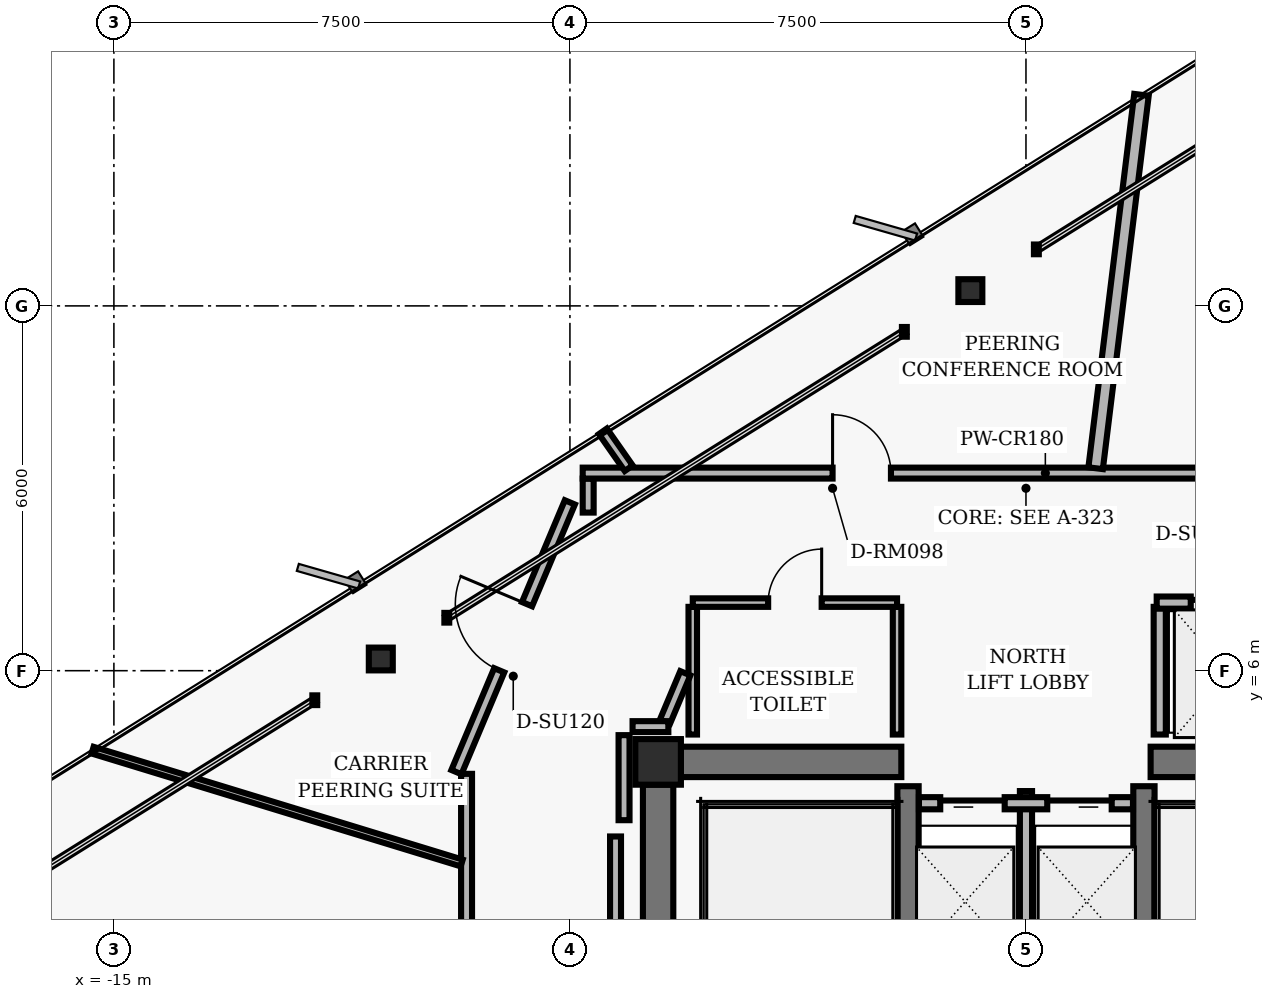
"""IFC4 building model, lengths in metres.
Left out: names, types, materials, properties, quantities, classifications, styles, units other than length and angle.
Written with IfcOpenShell. Run it as: python <this file> out.ifc"""

import sys

from ifc_helpers import new_model, si_unit, direction, frame, frame_2d, origin, origin_2d, place, context, subcontext, project, spatial, rectangle, hollow_rectangle, i_section, extrude, element, fill, save


model = new_model("IFC4")
c1 = context("Model", 3, precision=1e-05, world=origin(), true_north=direction((0.0, 1.0)))
c2 = subcontext(c1, "Body", "Model", "MODEL_VIEW")
j1 = project(units=[si_unit("LENGTHUNIT", "METRE"), si_unit("PLANEANGLEUNIT", "RADIAN")], contexts=[c1])
p1 = place(None, origin())
s1 = spatial("IfcSite", under=j1, at=p1, CompositionType="ELEMENT")
p2 = place(p1, origin())
s2 = spatial("IfcBuilding", under=s1, at=p2, CompositionType="ELEMENT")
p3 = place(p2, frame((0.0, 0.0, 211.84)))
s3 = spatial("IfcBuildingStorey", under=s2, at=p3, CompositionType="ELEMENT", Elevation=211.84)
p4 = place(p3, frame((-6.05, 4.5, 0.0), z_axis=(0.0, 0.0, 1.0), x_axis=(1.0, 0.0, 0.0)))
e1 = element("IfcColumn", 1, at=p4, inside=s3, PredefinedType="COLUMN", context=c2, shape_type="SweptSolid", body=[
    extrude(hollow_rectangle(XDim=0.75, YDim=0.75, WallThickness=0.05, InnerFilletRadius=0.02, OuterFilletRadius=0.04, at=origin_2d()), origin(), (0.0, 0.0, 1.0), 3.04),
])
p5 = place(p3, frame((-6.05, 0.375, 0.0), z_axis=(0.0, 0.0, 1.0), x_axis=(0.0, 1.0, 0.0)))
e2 = element("IfcWall", 2, at=p5, inside=s3, PredefinedType="SHEAR", context=c2, shape_type="SweptSolid", body=[
    extrude(rectangle(XDim=3.75, YDim=0.5, at=frame_2d((1.875, 0.0))), origin(), (0.0, 0.0, 1.0), 2.618),
])
for number, where, z_axis, x_axis in (
    (3, (-1.94, -4.1, 0.0), (0.0, 0.0, 1.0), (0.0, 1.0, 0.0)),
    (4, (1.94, -4.1, 0.0), (0.0, 0.0, 1.0), (0.0, 1.0, 0.0)),
):
    element("IfcWall", number, at=place(p3, frame(where, z_axis=z_axis, x_axis=x_axis)), inside=s3, PredefinedType="SHEAR", context=c2, shape_type="SweptSolid", body=[
        extrude(rectangle(XDim=8.2, YDim=0.35, at=frame_2d((4.1, 0.0))), origin(), (0.0, 0.0, 1.0), 2.618),
    ])
for number, where, z_axis, x_axis in (
    (5, (-5.675, 4.5, 0.0), (0.0, 0.0, 1.0), (1.0, 0.0, 0.0)),
    (6, (2.05, 4.5, 0.0), (0.0, 0.0, 1.0), (1.0, 0.0, 0.0)),
):
    element("IfcWall", number, at=place(p3, frame(where, z_axis=z_axis, x_axis=x_axis)), inside=s3, PredefinedType="SHEAR", context=c2, shape_type="SweptSolid", body=[
        extrude(rectangle(XDim=3.625, YDim=0.5, at=frame_2d((1.812, 0.0))), origin(), (0.0, 0.0, 1.0), 2.618),
    ])
for number, where, z_axis, x_axis in (
    (7, (-0.915, 12.251, 0.0), (0.0, 0.0, 1.0), (1.0, 0.0, 0.0)),
    (8, (-10.611, 6.193, 0.0), (0.0, 0.0, 1.0), (1.0, 0.0, 0.0)),
):
    element("IfcColumn", number, at=place(p3, frame(where, z_axis=z_axis, x_axis=x_axis)), inside=s3, PredefinedType="COLUMN", context=c2, shape_type="SweptSolid", body=[
        extrude(i_section(OverallWidth=0.394, OverallDepth=0.375, WebThickness=0.017, FlangeThickness=0.028, FilletRadius=0.016, at=origin_2d()), origin(), (0.0, 0.0, 1.0), 3.04),
    ])
p6 = place(p3, frame((0.0, 1.25, 0.0), z_axis=(0.0, 0.0, 1.0), x_axis=(0.0, 1.0, 0.0)))
e9 = element("IfcWall", 9, at=p6, inside=s3, PredefinedType="PARTITIONING", context=c2, shape_type="SweptSolid", body=[
    extrude(rectangle(XDim=2.77, YDim=0.2, at=frame_2d((1.385, 0.0))), origin(), (0.0, 0.0, 1.0), 2.593),
])
p7 = place(p3, frame((-1.76, 3.82, 0.0), z_axis=(0.0, 0.0, 1.0), x_axis=(1.0, 0.0, 0.0)))
e10 = element("IfcWall", 10, at=p7, inside=s3, PredefinedType="PARTITIONING", context=c2, shape_type="SweptSolid", body=[
    extrude(rectangle(XDim=3.52, YDim=0.2, at=frame_2d((1.76, 0.0))), origin(), (0.0, 0.0, 1.0), 2.593),
])
p8 = place(p7, frame((0.35, 0.0, 0.0)))
e11 = element("IfcOpeningElement", 11, at=p8, cuts=e10, PredefinedType="OPENING", context=c2, shape_type="SweptSolid", body=[
    extrude(rectangle(XDim=1.06, YDim=2.04, at=frame_2d((0.53, 1.02))), frame((0.0, 0.11, 0.0), z_axis=(0.0, -1.0, 0.0), x_axis=(1.0, 0.0, 0.0)), (0.0, 0.0, 1.0), 0.22),
])
p9 = place(p7, frame((2.11, 0.0, 0.0)))
e12 = element("IfcOpeningElement", 12, at=p9, cuts=e10, PredefinedType="OPENING", context=c2, shape_type="SweptSolid", body=[
    extrude(rectangle(XDim=1.06, YDim=2.04, at=frame_2d((0.53, 1.02))), frame((0.0, 0.11, 0.0), z_axis=(0.0, -1.0, 0.0), x_axis=(1.0, 0.0, 0.0)), (0.0, 0.0, 1.0), 0.22),
])
p10 = place(p3, frame((2.2, 4.95, 0.0), z_axis=(0.0, 0.0, 1.0), x_axis=(0.0, 1.0, 0.0)))
e13 = element("IfcWall", 13, at=p10, inside=s3, PredefinedType="PARTITIONING", context=c2, shape_type="SweptSolid", body=[
    extrude(rectangle(XDim=2.1, YDim=0.2, at=frame_2d((1.05, 0.0))), origin(), (0.0, 0.0, 1.0), 2.593),
])
p11 = place(p3, frame((2.15, 7.12, 0.0), z_axis=(0.0, 0.0, 1.0), x_axis=(1.0, 0.0, 0.0)))
e14 = element("IfcWall", 14, at=p11, inside=s3, PredefinedType="PARTITIONING", context=c2, shape_type="SweptSolid", body=[
    extrude(rectangle(XDim=2.38, YDim=0.2, at=frame_2d((1.19, 0.0))), origin(), (0.0, 0.0, 1.0), 2.593),
])
p12 = place(p11, frame((0.56, 0.0, 0.0)))
e15 = element("IfcOpeningElement", 15, at=p12, cuts=e14, PredefinedType="OPENING", context=c2, shape_type="SweptSolid", body=[
    extrude(rectangle(XDim=1.26, YDim=2.06, at=frame_2d((0.63, 1.03))), frame((0.0, 0.11, 0.0), z_axis=(0.0, -1.0, 0.0), x_axis=(1.0, 0.0, 0.0)), (0.0, 0.0, 1.0), 0.22),
])
for number, where, z_axis, x_axis in (
    (16, (-5.48, 4.95, 0.0), (0.0, 0.0, 1.0), (0.0, 1.0, 0.0)),
    (17, (-2.12, 4.95, 0.0), (0.0, 0.0, 1.0), (0.0, 1.0, 0.0)),
):
    element("IfcWall", number, at=place(p3, frame(where, z_axis=z_axis, x_axis=x_axis)), inside=s3, PredefinedType="PARTITIONING", context=c2, shape_type="SweptSolid", body=[
        extrude(rectangle(XDim=2.1, YDim=0.14, at=frame_2d((1.05, 0.0))), origin(), (0.0, 0.0, 1.0), 2.593),
    ])
p13 = place(p3, frame((-5.48, 7.12, 0.0), z_axis=(0.0, 0.0, 1.0), x_axis=(1.0, 0.0, 0.0)))
e18 = element("IfcWall", 18, at=p13, inside=s3, PredefinedType="PARTITIONING", context=c2, shape_type="SweptSolid", body=[
    extrude(rectangle(XDim=3.36, YDim=0.14, at=frame_2d((1.68, 0.0))), origin(), (0.0, 0.0, 1.0), 2.593),
])
p14 = place(p13, frame((1.24, 0.0, 0.0)))
e19 = element("IfcOpeningElement", 19, at=p14, cuts=e18, PredefinedType="OPENING", context=c2, shape_type="SweptSolid", body=[
    extrude(rectangle(XDim=0.88, YDim=2.02, at=frame_2d((0.44, 1.01))), frame((0.0, 0.08, 0.0), z_axis=(0.0, -1.0, 0.0), x_axis=(1.0, 0.0, 0.0)), (0.0, 0.0, 1.0), 0.16),
])
p15 = place(p3, frame((-9.2, -4.303, 0.0), z_axis=(0.0, 0.0, 1.0), x_axis=(0.0, 1.0, 0.0)))
e20 = element("IfcWall", 20, at=p15, inside=s3, PredefinedType="PARTITIONING", context=c2, shape_type="SweptSolid", body=[
    extrude(rectangle(XDim=8.607, YDim=0.18, at=frame_2d((4.303, 0.0))), origin(), (0.0, 0.0, 1.0), 2.593),
])
p16 = place(p15, frame((3.713, 0.0, 0.0)))
e21 = element("IfcOpeningElement", 21, at=p16, cuts=e20, PredefinedType="OPENING", context=c2, shape_type="SweptSolid", body=[
    extrude(rectangle(XDim=1.18, YDim=2.02, at=frame_2d((0.59, 1.01))), frame((0.0, 0.1, 0.0), z_axis=(0.0, -1.0, 0.0), x_axis=(1.0, 0.0, 0.0)), (0.0, 0.0, 1.0), 0.2),
])
p17 = place(p3, frame((-9.367, 4.332, 0.0), z_axis=(0.0, 0.0, 1.0), x_axis=(0.387573945081, 0.921838617706, 0.0)))
e22 = element("IfcWall", 22, at=p17, inside=s3, PredefinedType="PARTITIONING", context=c2, shape_type="SweptSolid", body=[
    extrude(rectangle(XDim=4.813, YDim=0.18, at=frame_2d((2.407, 0.0))), origin(), (0.0, 0.0, 1.0), 2.593),
])
p18 = place(p17, frame((1.817, 0.0, 0.0)))
e23 = element("IfcOpeningElement", 23, at=p18, cuts=e22, PredefinedType="OPENING", context=c2, shape_type="SweptSolid", body=[
    extrude(rectangle(XDim=1.18, YDim=2.02, at=frame_2d((0.59, 1.01))), frame((0.0, 0.1, 0.0), z_axis=(0.0, -1.0, 0.0), x_axis=(1.0, 0.0, 0.0)), (0.0, 0.0, 1.0), 0.2),
])
p19 = place(p3, frame((-7.2, 8.601, 0.0), z_axis=(0.0, 0.0, 1.0), x_axis=(0.0, 1.0, 0.0)))
e24 = element("IfcWall", 24, at=p19, inside=s3, PredefinedType="PARTITIONING", context=c2, shape_type="SweptSolid", body=[
    extrude(rectangle(XDim=0.559, YDim=0.18, at=frame_2d((0.28, 0.0))), origin(), (0.0, 0.0, 1.0), 2.593),
])
p20 = place(p3, frame((-7.29, 9.25, 0.0), z_axis=(0.0, 0.0, 1.0), x_axis=(1.0, 0.0, 0.0)))
e25 = element("IfcWall", 25, at=p20, inside=s3, PredefinedType="PARTITIONING", context=c2, shape_type="SweptSolid", body=[
    extrude(rectangle(XDim=13.3, YDim=0.18, at=frame_2d((6.65, 0.0))), origin(), (0.0, 0.0, 1.0), 2.593),
])
p21 = place(p20, frame((10.148, 0.0, 0.0)))
e26 = element("IfcOpeningElement", 26, at=p21, cuts=e25, PredefinedType="OPENING", context=c2, shape_type="SweptSolid", body=[
    extrude(rectangle(XDim=1.18, YDim=2.02, at=frame_2d((0.59, 1.01))), frame((0.0, 0.1, 0.0), z_axis=(0.0, -1.0, 0.0), x_axis=(1.0, 0.0, 0.0)), (0.0, 0.0, 1.0), 0.2),
])
p22 = place(p20, frame((4.11, 0.0, 0.0)))
e27 = element("IfcOpeningElement", 27, at=p22, cuts=e25, PredefinedType="OPENING", context=c2, shape_type="SweptSolid", body=[
    extrude(rectangle(XDim=0.96, YDim=2.02, at=frame_2d((0.48, 1.01))), frame((0.0, 0.1, 0.0), z_axis=(0.0, -1.0, 0.0), x_axis=(1.0, 0.0, 0.0)), (0.0, 0.0, 1.0), 0.2),
])
p23 = place(p3, frame((-5.602, 5.958, 0.0), z_axis=(0.0, 0.0, 1.0), x_axis=(-0.387588639363, -0.921832439566, 0.0)))
e28 = element("IfcWall", 28, at=p23, inside=s3, PredefinedType="PARTITIONING", context=c2, shape_type="SweptSolid", body=[
    extrude(rectangle(XDim=0.862, YDim=0.18, at=frame_2d((0.431, 0.0))), origin(), (0.0, 0.0, 1.0), 2.593),
])
p24 = place(p3, frame((-5.881, 5.08, 0.0), z_axis=(0.0, 0.0, 1.0), x_axis=(-1.0, 0.0, 0.0)))
e29 = element("IfcWall", 29, at=p24, inside=s3, PredefinedType="PARTITIONING", context=c2, shape_type="SweptSolid", body=[
    extrude(rectangle(XDim=0.589, YDim=0.18, at=frame_2d((0.294, 0.0))), origin(), (0.0, 0.0, 1.0), 2.593),
])
p25 = place(p3, frame((-6.61, 4.94, 0.0), z_axis=(0.0, 0.0, 1.0), x_axis=(0.0, -1.0, 0.0)))
e30 = element("IfcWall", 30, at=p25, inside=s3, PredefinedType="PARTITIONING", context=c2, shape_type="SweptSolid", body=[
    extrude(rectangle(XDim=1.399, YDim=0.18, at=frame_2d((0.699, 0.0))), origin(), (0.0, 0.0, 1.0), 2.593),
])
p26 = place(p3, frame((-6.75, 3.273, 0.0), z_axis=(0.0, 0.0, 1.0), x_axis=(0.0, -1.0, 0.0)))
e31 = element("IfcWall", 31, at=p26, inside=s3, PredefinedType="PARTITIONING", context=c2, shape_type="SweptSolid", body=[
    extrude(rectangle(XDim=6.547, YDim=0.18, at=frame_2d((3.273, 0.0))), origin(), (0.0, 0.0, 1.0), 2.593),
])
p27 = place(p3, frame((1.146, 9.33, 0.0), z_axis=(0.0, 0.0, 1.0), x_axis=(0.121873572304, 0.992545632389, 0.0)))
e32 = element("IfcWall", 32, at=p27, inside=s3, PredefinedType="PARTITIONING", context=c2, shape_type="SweptSolid", body=[
    extrude(rectangle(XDim=6.188, YDim=0.24, at=frame_2d((3.094, 0.0))), origin(), (0.0, 0.0, 1.0), 2.593),
])
p28 = place(p3, frame((-6.533, 9.33, 0.0), z_axis=(0.0, 0.0, 1.0), x_axis=(-0.573639237496, 0.819108066866, 0.0)))
e33 = element("IfcWall", 33, at=p28, inside=s3, PredefinedType="PARTITIONING", context=c2, shape_type="SweptSolid", body=[
    extrude(rectangle(XDim=0.741, YDim=0.16, at=frame_2d((0.371, 0.0))), origin(), (0.0, 0.0, 1.0), 2.593),
])
p29 = place(p3, frame((-9.28, 2.837, 0.0), z_axis=(0.0, 0.0, 1.0), x_axis=(-0.956301397149, 0.292382690682, 0.0)))
e34 = element("IfcWall", 34, at=p29, inside=s3, PredefinedType="MOVABLE", context=c2, shape_type="SweptSolid", body=[
    extrude(rectangle(XDim=6.348, YDim=0.115, at=frame_2d((3.174, 0.0))), origin(), (0.0, 0.0, 1.0), 2.593),
])
p30 = place(p8, origin())
e35 = element("IfcDoor", 35, at=p30, inside=s3, OperationType="SLIDING_TO_LEFT", PredefinedType="DOOR", context=c2, shape_type="SweptSolid", body=[
    extrude(rectangle(XDim=1.06, YDim=2.04, at=frame_2d((0.53, 1.02))), frame((0.0, 0.025, 0.0), z_axis=(0.0, -1.0, 0.0), x_axis=(1.0, 0.0, 0.0)), (0.0, 0.0, 1.0), 0.05),
])
fill(e11, e35)
p31 = place(p9, origin())
e36 = element("IfcDoor", 36, at=p31, inside=s3, OperationType="SLIDING_TO_RIGHT", PredefinedType="DOOR", context=c2, shape_type="SweptSolid", body=[
    extrude(rectangle(XDim=1.06, YDim=2.04, at=frame_2d((0.53, 1.02))), frame((0.0, 0.025, 0.0), z_axis=(0.0, -1.0, 0.0), x_axis=(1.0, 0.0, 0.0)), (0.0, 0.0, 1.0), 0.05),
])
fill(e12, e36)
p32 = place(p12, origin())
e37 = element("IfcDoor", 37, at=p32, inside=s3, OperationType="SLIDING_TO_LEFT", PredefinedType="DOOR", context=c2, shape_type="SweptSolid", body=[
    extrude(rectangle(XDim=1.26, YDim=2.06, at=frame_2d((0.63, 1.03))), frame((0.0, 0.025, 0.0), z_axis=(0.0, -1.0, 0.0), x_axis=(1.0, 0.0, 0.0)), (0.0, 0.0, 1.0), 0.05),
])
fill(e15, e37)
p33 = place(p14, origin())
e38 = element("IfcDoor", 38, at=p33, inside=s3, OperationType="SINGLE_SWING_RIGHT", PredefinedType="DOOR", context=c2, shape_type="SweptSolid", body=[
    extrude(rectangle(XDim=0.88, YDim=2.02, at=frame_2d((0.44, 1.01))), frame((0.0, 0.025, 0.0), z_axis=(0.0, -1.0, 0.0), x_axis=(1.0, 0.0, 0.0)), (0.0, 0.0, 1.0), 0.05),
])
fill(e19, e38)
p34 = place(p22, origin())
e39 = element("IfcDoor", 39, at=p34, inside=s3, OperationType="SINGLE_SWING_LEFT", PredefinedType="DOOR", context=c2, shape_type="SweptSolid", body=[
    extrude(rectangle(XDim=0.96, YDim=2.02, at=frame_2d((0.48, 1.01))), frame((0.0, 0.025, 0.0), z_axis=(0.0, -1.0, 0.0), x_axis=(1.0, 0.0, 0.0)), (0.0, 0.0, 1.0), 0.05),
])
fill(e27, e39)
p35 = place(p18, origin())
e40 = element("IfcDoor", 40, at=p35, inside=s3, OperationType="SINGLE_SWING_RIGHT", PredefinedType="DOOR", context=c2, shape_type="SweptSolid", body=[
    extrude(rectangle(XDim=1.18, YDim=2.02, at=frame_2d((0.59, 1.01))), frame((0.0, 0.025, 0.0), z_axis=(0.0, -1.0, 0.0), x_axis=(1.0, 0.0, 0.0)), (0.0, 0.0, 1.0), 0.05),
])
fill(e23, e40)
save(model, sys.argv[1])
